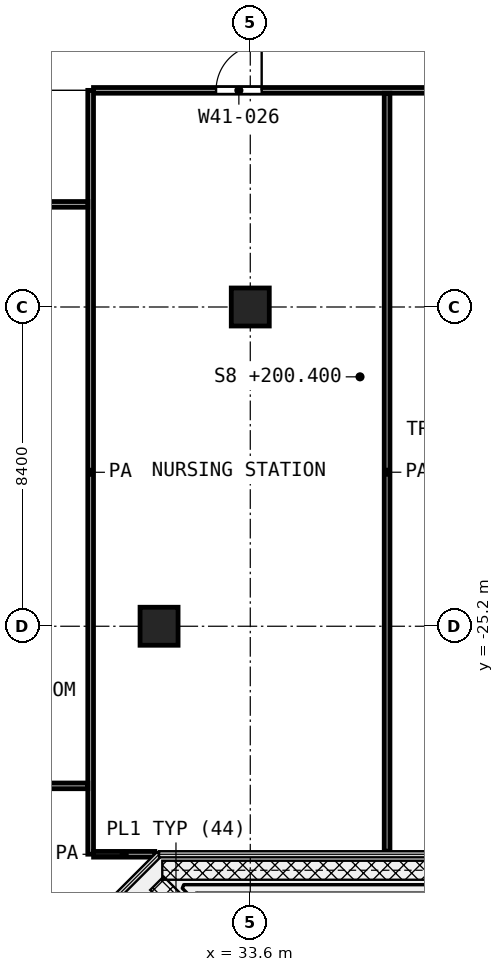
"""IFC4 building model, lengths in metres.
Left out: names, types, materials, properties, quantities, classifications, styles, units other than length and angle.
Written with IfcOpenShell. Run it as: python <this file> out.ifc"""

import sys

from ifc_helpers import new_model, si_unit, direction, frame, frame_2d, origin, origin_2d, place, context, subcontext, project, spatial, rectangle, extrude, element, fill, save


model = new_model("IFC4")
c1 = context("Model", 3, precision=1e-05, world=origin(), true_north=direction((0.0, 1.0)))
c2 = subcontext(c1, "Body", "Model", "MODEL_VIEW")
j1 = project(units=[si_unit("LENGTHUNIT", "METRE"), si_unit("PLANEANGLEUNIT", "RADIAN")], contexts=[c1])
p1 = place(None, origin())
s1 = spatial("IfcSite", under=j1, at=p1, CompositionType="ELEMENT")
p2 = place(p1, origin())
s2 = spatial("IfcBuilding", under=s1, at=p2, CompositionType="ELEMENT")
p3 = place(p2, frame((0.0, 0.0, 200.4)))
s3 = spatial("IfcBuildingStorey", under=s2, at=p3, CompositionType="ELEMENT", Elevation=200.4)
for number, where, z_axis, x_axis in (
    (1, (33.6, -16.8, 0.0), (0.0, 0.0, 1.0), (1.0, 0.0, 0.0)),
    (2, (31.2, -25.2, 0.0), (0.0, 0.0, 1.0), (1.0, 0.0, 0.0)),
):
    element("IfcColumn", number, at=place(p3, frame(where, z_axis=z_axis, x_axis=x_axis)), inside=s3, PredefinedType="COLUMN", context=c2, shape_type="SweptSolid", body=[
        extrude(rectangle(XDim=1.0, YDim=1.0, at=origin_2d()), origin(), (0.0, 0.0, 1.0), 4.2),
    ])
p4 = place(p3, frame((29.477, -31.2, 0.0), z_axis=(0.0, 0.0, 1.0), x_axis=(1.0, 0.0, 0.0)))
e3 = element("IfcWall", 3, at=p4, inside=s3, PredefinedType="PARTITIONING", context=c2, shape_type="SweptSolid", body=[
    extrude(rectangle(XDim=1.61, YDim=0.15, at=frame_2d((0.805, 0.0))), origin(), (0.0, 0.0, 1.0), 3.6),
])
p5 = place(p3, frame((11.175, -29.4, 0.0), z_axis=(0.0, 0.0, 1.0), x_axis=(1.0, 0.0, 0.0)))
e4 = element("IfcWall", 4, at=p5, inside=s3, PredefinedType="PARTITIONING", context=c2, shape_type="SweptSolid", body=[
    extrude(rectangle(XDim=18.15, YDim=0.15, at=frame_2d((9.075, 0.0))), origin(), (0.0, 0.0, 1.0), 3.6),
])
p6 = place(p3, frame((24.9, -14.1, 0.0), z_axis=(0.0, 0.0, 1.0), x_axis=(1.0, 0.0, 0.0)))
e5 = element("IfcWall", 5, at=p6, inside=s3, PredefinedType="PARTITIONING", context=c2, shape_type="SweptSolid", body=[
    extrude(rectangle(XDim=4.425, YDim=0.15, at=frame_2d((2.212, 0.0))), origin(), (0.0, 0.0, 1.0), 3.6),
])
p7 = place(p6, frame((1.65, 0.0, 0.0)))
e6 = element("IfcOpeningElement", 6, at=p7, cuts=e5, PredefinedType="OPENING", context=c2, shape_type="SweptSolid", body=[
    extrude(rectangle(XDim=1.5, YDim=2.1, at=frame_2d((0.75, 1.05))), frame((0.0, 0.085, 0.0), z_axis=(0.0, -1.0, 0.0), x_axis=(1.0, 0.0, 0.0)), (0.0, 0.0, 1.0), 0.17),
])
p8 = place(p3, frame((29.475, -11.1, 0.0), z_axis=(0.0, 0.0, 1.0), x_axis=(1.0, 0.0, 0.0)))
e7 = element("IfcWall", 7, at=p8, inside=s3, PredefinedType="PARTITIONING", context=c2, shape_type="SweptSolid", body=[
    extrude(rectangle(XDim=37.645, YDim=0.15, at=frame_2d((18.823, 0.0))), origin(), (0.0, 0.0, 1.0), 3.6),
])
p9 = place(p8, frame((3.225, 0.0, 0.0)))
e8 = element("IfcOpeningElement", 8, at=p9, cuts=e7, PredefinedType="OPENING", context=c2, shape_type="SweptSolid", body=[
    extrude(rectangle(XDim=1.2, YDim=2.1, at=frame_2d((0.6, 1.05))), frame((0.0, 0.085, 0.0), z_axis=(0.0, -1.0, 0.0), x_axis=(1.0, 0.0, 0.0)), (0.0, 0.0, 1.0), 0.17),
])
p10 = place(p8, frame((9.625, 0.0, 0.0)))
e9 = element("IfcOpeningElement", 9, at=p10, cuts=e7, PredefinedType="OPENING", context=c2, shape_type="SweptSolid", body=[
    extrude(rectangle(XDim=1.0, YDim=2.1, at=frame_2d((0.5, 1.05))), frame((0.0, 0.085, 0.0), z_axis=(0.0, -1.0, 0.0), x_axis=(1.0, 0.0, 0.0)), (0.0, 0.0, 1.0), 0.17),
])
p11 = place(p8, frame((14.125, 0.0, 0.0)))
e10 = element("IfcOpeningElement", 10, at=p11, cuts=e7, PredefinedType="OPENING", context=c2, shape_type="SweptSolid", body=[
    extrude(rectangle(XDim=1.0, YDim=2.1, at=frame_2d((0.5, 1.05))), frame((0.0, 0.085, 0.0), z_axis=(0.0, -1.0, 0.0), x_axis=(1.0, 0.0, 0.0)), (0.0, 0.0, 1.0), 0.17),
])
p12 = place(p8, frame((18.225, 0.0, 0.0)))
e11 = element("IfcOpeningElement", 11, at=p12, cuts=e7, PredefinedType="OPENING", context=c2, shape_type="SweptSolid", body=[
    extrude(rectangle(XDim=1.2, YDim=2.1, at=frame_2d((0.6, 1.05))), frame((0.0, 0.085, 0.0), z_axis=(0.0, -1.0, 0.0), x_axis=(1.0, 0.0, 0.0)), (0.0, 0.0, 1.0), 0.17),
])
p13 = place(p8, frame((22.825, 0.0, 0.0)))
e12 = element("IfcOpeningElement", 12, at=p13, cuts=e7, PredefinedType="OPENING", context=c2, shape_type="SweptSolid", body=[
    extrude(rectangle(XDim=1.0, YDim=2.1, at=frame_2d((0.5, 1.05))), frame((0.0, 0.085, 0.0), z_axis=(0.0, -1.0, 0.0), x_axis=(1.0, 0.0, 0.0)), (0.0, 0.0, 1.0), 0.17),
])
p14 = place(p8, frame((27.025, 0.0, 0.0)))
e13 = element("IfcOpeningElement", 13, at=p14, cuts=e7, PredefinedType="OPENING", context=c2, shape_type="SweptSolid", body=[
    extrude(rectangle(XDim=1.0, YDim=2.1, at=frame_2d((0.5, 1.05))), frame((0.0, 0.085, 0.0), z_axis=(0.0, -1.0, 0.0), x_axis=(1.0, 0.0, 0.0)), (0.0, 0.0, 1.0), 0.17),
])
p15 = place(p8, frame((32.775, 0.0, 0.0)))
e14 = element("IfcOpeningElement", 14, at=p15, cuts=e7, PredefinedType="OPENING", context=c2, shape_type="SweptSolid", body=[
    extrude(rectangle(XDim=1.5, YDim=2.1, at=frame_2d((0.75, 1.05))), frame((0.0, 0.085, 0.0), z_axis=(0.0, -1.0, 0.0), x_axis=(1.0, 0.0, 0.0)), (0.0, 0.0, 1.0), 0.17),
])
p16 = place(p3, frame((29.4, -31.198, 0.0), z_axis=(0.0, 0.0, 1.0), x_axis=(0.0, 1.0, 0.0)))
e15 = element("IfcWall", 15, at=p16, inside=s3, PredefinedType="PARTITIONING", context=c2, shape_type="SweptSolid", body=[
    extrude(rectangle(XDim=20.098, YDim=0.15, at=frame_2d((10.049, 0.0))), origin(), (0.0, 0.0, 1.0), 3.6),
])
p17 = place(p3, frame((37.2, -31.12, 0.0), z_axis=(0.0, 0.0, 1.0), x_axis=(0.0, 1.0, 0.0)))
e16 = element("IfcWall", 16, at=p17, inside=s3, PredefinedType="PARTITIONING", context=c2, shape_type="SweptSolid", body=[
    extrude(rectangle(XDim=19.945, YDim=0.15, at=frame_2d((9.973, 0.0))), origin(), (0.0, 0.0, 1.0), 3.6),
])
p18 = place(p9, origin())
e17 = element("IfcDoor", 17, at=p18, inside=s3, OperationType="SINGLE_SWING_RIGHT", PredefinedType="DOOR", context=c2, shape_type="SweptSolid", body=[
    extrude(rectangle(XDim=1.2, YDim=2.1, at=frame_2d((0.6, 1.05))), frame((0.0, 0.025, 0.0), z_axis=(0.0, -1.0, 0.0), x_axis=(1.0, 0.0, 0.0)), (0.0, 0.0, 1.0), 0.05),
])
fill(e8, e17)
save(model, sys.argv[1])
